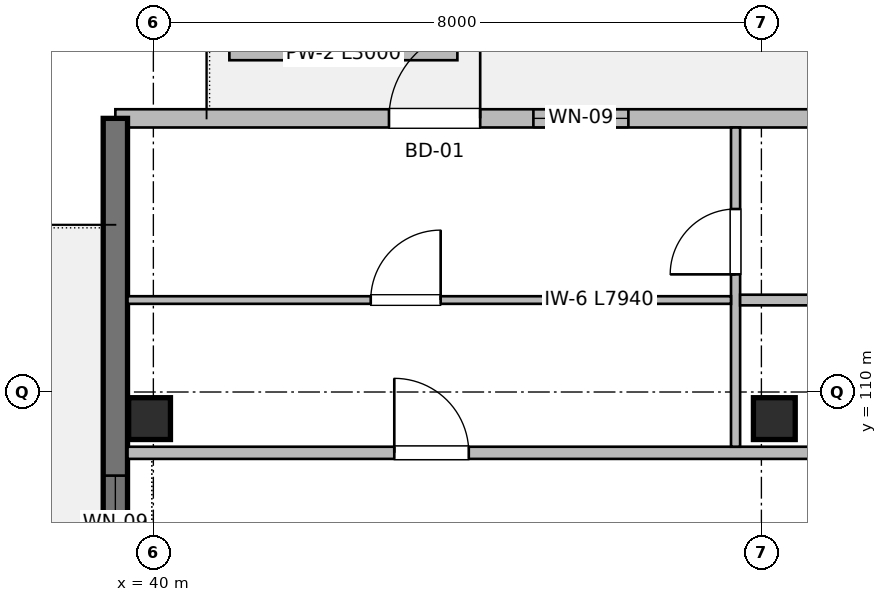
"""IFC4 building model, lengths in metres.
Left out: names, types, materials, properties, quantities, classifications, styles, units other than length and angle.
Written with IfcOpenShell. Run it as: python <this file> out.ifc"""

import sys

from ifc_helpers import new_model, si_unit, direction, frame, frame_2d, origin, origin_2d, place, context, subcontext, project, spatial, rectangle, extrude, element, fill, save


model = new_model("IFC4")
c1 = context("Model", 3, precision=1e-05, world=origin(), true_north=direction((0.0, 1.0)))
c2 = subcontext(c1, "Body", "Model", "MODEL_VIEW")
j1 = project(units=[si_unit("LENGTHUNIT", "METRE"), si_unit("PLANEANGLEUNIT", "RADIAN")], contexts=[c1])
p1 = place(None, origin())
s1 = spatial("IfcSite", under=j1, at=p1, CompositionType="ELEMENT")
p2 = place(p1, origin())
s2 = spatial("IfcBuilding", under=s1, at=p2, CompositionType="ELEMENT")
p3 = place(p2, frame((0.0, 0.0, 26.56)))
s3 = spatial("IfcBuildingStorey", under=s2, at=p3, CompositionType="ELEMENT", Elevation=26.56)
for number, where, z_axis, x_axis in (
    (1, (39.95, 109.65, 0.0), (0.0, 0.0, 1.0), (1.0, 0.0, 0.0)),
    (2, (48.17, 109.65, 0.0), (0.0, 0.0, 1.0), (1.0, 0.0, 0.0)),
):
    element("IfcColumn", number, at=place(p3, frame(where, z_axis=z_axis, x_axis=x_axis)), inside=s3, PredefinedType="COLUMN", context=c2, shape_type="SweptSolid", body=[
        extrude(rectangle(XDim=0.55, YDim=0.55, at=origin_2d()), origin(), (0.0, 0.0, 1.0), 3.2),
    ])
p4 = place(p3, frame((39.5, 113.6, 0.0), z_axis=(0.0, 0.0, 1.0), x_axis=(1.0, 0.0, 0.0)))
e3 = element("IfcWall", 3, at=p4, inside=s3, PredefinedType="SOLIDWALL", context=c2, shape_type="SweptSolid", body=[
    extrude(rectangle(XDim=42.0, YDim=0.24, at=frame_2d((21.0, 0.0))), origin(), (0.0, 0.0, 1.0), 2.98),
])
p5 = place(p4, frame((3.6, 0.0, 0.0)))
e4 = element("IfcOpeningElement", 4, at=p5, cuts=e3, PredefinedType="OPENING", context=c2, shape_type="SweptSolid", body=[
    extrude(rectangle(XDim=1.2, YDim=2.2, at=frame_2d((0.6, 1.1))), frame((0.0, 0.13, 0.0), z_axis=(0.0, -1.0, 0.0), x_axis=(1.0, 0.0, 0.0)), (0.0, 0.0, 1.0), 0.26),
])
p6 = place(p4, frame((5.5, 0.0, 0.87)))
e5 = element("IfcOpeningElement", 5, at=p6, cuts=e3, PredefinedType="OPENING", context=c2, shape_type="SweptSolid", body=[
    extrude(rectangle(XDim=1.25, YDim=1.35, at=frame_2d((0.625, 0.675))), frame((0.0, 0.13, 0.0), z_axis=(0.0, -1.0, 0.0), x_axis=(1.0, 0.0, 0.0)), (0.0, 0.0, 1.0), 0.26),
])
p7 = place(p4, frame((11.76, 0.0, 0.72)))
e6 = element("IfcOpeningElement", 6, at=p7, cuts=e3, PredefinedType="OPENING", context=c2, shape_type="SweptSolid", body=[
    extrude(rectangle(XDim=1.68, YDim=1.5, at=frame_2d((0.84, 0.75))), frame((0.0, 0.13, 0.0), z_axis=(0.0, -1.0, 0.0), x_axis=(1.0, 0.0, 0.0)), (0.0, 0.0, 1.0), 0.26),
])
p8 = place(p4, frame((20.4, 0.0, 0.0)))
e7 = element("IfcOpeningElement", 7, at=p8, cuts=e3, PredefinedType="OPENING", context=c2, shape_type="SweptSolid", body=[
    extrude(rectangle(XDim=1.2, YDim=2.2, at=frame_2d((0.6, 1.1))), frame((0.0, 0.13, 0.0), z_axis=(0.0, -1.0, 0.0), x_axis=(1.0, 0.0, 0.0)), (0.0, 0.0, 1.0), 0.26),
])
p9 = place(p4, frame((22.3, 0.0, 0.67)))
e8 = element("IfcOpeningElement", 8, at=p9, cuts=e3, PredefinedType="OPENING", context=c2, shape_type="SweptSolid", body=[
    extrude(rectangle(XDim=2.1, YDim=1.55, at=frame_2d((1.05, 0.775))), frame((0.0, 0.13, 0.0), z_axis=(0.0, -1.0, 0.0), x_axis=(1.0, 0.0, 0.0)), (0.0, 0.0, 1.0), 0.26),
])
p10 = place(p4, frame((28.4, 0.0, 0.72)))
e9 = element("IfcOpeningElement", 9, at=p10, cuts=e3, PredefinedType="OPENING", context=c2, shape_type="SweptSolid", body=[
    extrude(rectangle(XDim=2.0, YDim=1.5, at=frame_2d((1.0, 0.75))), frame((0.0, 0.13, 0.0), z_axis=(0.0, -1.0, 0.0), x_axis=(1.0, 0.0, 0.0)), (0.0, 0.0, 1.0), 0.26),
])
p11 = place(p4, frame((37.2, 0.0, 0.0)))
e10 = element("IfcOpeningElement", 10, at=p11, cuts=e3, PredefinedType="OPENING", context=c2, shape_type="SweptSolid", body=[
    extrude(rectangle(XDim=1.2, YDim=2.2, at=frame_2d((0.6, 1.1))), frame((0.0, 0.13, 0.0), z_axis=(0.0, -1.0, 0.0), x_axis=(1.0, 0.0, 0.0)), (0.0, 0.0, 1.0), 0.26),
])
p12 = place(p4, frame((39.1, 0.0, 0.9)))
e11 = element("IfcOpeningElement", 11, at=p12, cuts=e3, PredefinedType="OPENING", context=c2, shape_type="SweptSolid", body=[
    extrude(rectangle(XDim=1.05, YDim=1.15, at=frame_2d((0.525, 0.575))), frame((0.0, 0.13, 0.0), z_axis=(0.0, -1.0, 0.0), x_axis=(1.0, 0.0, 0.0)), (0.0, 0.0, 1.0), 0.26),
])
p13 = place(p3, frame((39.5, 100.0, 0.0), z_axis=(0.0, 0.0, 1.0), x_axis=(0.0, 1.0, 0.0)))
e12 = element("IfcWall", 12, at=p13, inside=s3, PredefinedType="SHEAR", context=c2, shape_type="SweptSolid", body=[
    extrude(rectangle(XDim=13.6, YDim=0.32, at=frame_2d((6.8, 0.0))), origin(), (0.0, 0.0, 1.0), 2.98),
])
p14 = place(p13, frame((4.9, 0.0, 0.0)))
e13 = element("IfcOpeningElement", 13, at=p14, cuts=e12, PredefinedType="OPENING", context=c2, shape_type="SweptSolid", body=[
    extrude(rectangle(XDim=1.2, YDim=2.2, at=frame_2d((0.6, 1.1))), frame((0.0, 0.17, 0.0), z_axis=(0.0, -1.0, 0.0), x_axis=(1.0, 0.0, 0.0)), (0.0, 0.0, 1.0), 0.34),
])
p15 = place(p13, frame((7.65, 0.0, 0.87)))
e14 = element("IfcOpeningElement", 14, at=p15, cuts=e12, PredefinedType="OPENING", context=c2, shape_type="SweptSolid", body=[
    extrude(rectangle(XDim=1.25, YDim=1.35, at=frame_2d((0.625, 0.675))), frame((0.0, 0.17, 0.0), z_axis=(0.0, -1.0, 0.0), x_axis=(1.0, 0.0, 0.0)), (0.0, 0.0, 1.0), 0.34),
])
p16 = place(p3, frame((41.0, 114.45, 0.0), z_axis=(0.0, 0.0, 1.0), x_axis=(1.0, 0.0, 0.0)))
e15 = element("IfcWall", 15, at=p16, inside=s3, PredefinedType="PARAPET", context=c2, shape_type="SweptSolid", body=[
    extrude(rectangle(XDim=3.0, YDim=0.17, at=frame_2d((1.5, 0.0))), origin(), (0.0, 0.0, 1.0), 0.45),
])
p17 = place(p3, frame((39.66, 109.2, 0.0), z_axis=(0.0, 0.0, 1.0), x_axis=(1.0, 0.0, 0.0)))
e16 = element("IfcWall", 16, at=p17, inside=s3, PredefinedType="PARTITIONING", context=c2, shape_type="SweptSolid", body=[
    extrude(rectangle(XDim=41.68, YDim=0.16, at=frame_2d((20.84, 0.0))), origin(), (0.0, 0.0, 1.0), 2.935),
])
p18 = place(p17, frame((3.51, 0.0, 0.0)))
e17 = element("IfcOpeningElement", 17, at=p18, cuts=e16, PredefinedType="OPENING", context=c2, shape_type="SweptSolid", body=[
    extrude(rectangle(XDim=0.98, YDim=2.15, at=frame_2d((0.49, 1.075))), frame((0.0, 0.09, 0.0), z_axis=(0.0, -1.0, 0.0), x_axis=(1.0, 0.0, 0.0)), (0.0, 0.0, 1.0), 0.18),
])
p19 = place(p17, frame((17.47, 0.0, 0.0)))
e18 = element("IfcOpeningElement", 18, at=p19, cuts=e16, PredefinedType="OPENING", context=c2, shape_type="SweptSolid", body=[
    extrude(rectangle(XDim=0.98, YDim=2.15, at=frame_2d((0.49, 1.075))), frame((0.0, 0.09, 0.0), z_axis=(0.0, -1.0, 0.0), x_axis=(1.0, 0.0, 0.0)), (0.0, 0.0, 1.0), 0.18),
])
p20 = place(p17, frame((31.39, 0.0, 0.0)))
e19 = element("IfcOpeningElement", 19, at=p20, cuts=e16, PredefinedType="OPENING", context=c2, shape_type="SweptSolid", body=[
    extrude(rectangle(XDim=0.98, YDim=2.15, at=frame_2d((0.49, 1.075))), frame((0.0, 0.09, 0.0), z_axis=(0.0, -1.0, 0.0), x_axis=(1.0, 0.0, 0.0)), (0.0, 0.0, 1.0), 0.18),
])
p21 = place(p3, frame((47.66, 109.28, 0.0), z_axis=(0.0, 0.0, 1.0), x_axis=(0.0, 1.0, 0.0)))
e20 = element("IfcWall", 20, at=p21, inside=s3, PredefinedType="PARTITIONING", context=c2, shape_type="SweptSolid", body=[
    extrude(rectangle(XDim=4.2, YDim=0.12, at=frame_2d((2.1, 0.0))), origin(), (0.0, 0.0, 1.0), 2.935),
])
p22 = place(p21, frame((2.268, 0.0, 0.0)))
e21 = element("IfcOpeningElement", 21, at=p22, cuts=e20, PredefinedType="OPENING", context=c2, shape_type="SweptSolid", body=[
    extrude(rectangle(XDim=0.86, YDim=2.1, at=frame_2d((0.43, 1.05))), frame((0.0, 0.07, 0.0), z_axis=(0.0, -1.0, 0.0), x_axis=(1.0, 0.0, 0.0)), (0.0, 0.0, 1.0), 0.14),
])
p23 = place(p3, frame((47.72, 111.21, 0.0), z_axis=(0.0, 0.0, 1.0), x_axis=(1.0, 0.0, 0.0)))
e22 = element("IfcWall", 22, at=p23, inside=s3, PredefinedType="PARTITIONING", context=c2, shape_type="SweptSolid", body=[
    extrude(rectangle(XDim=5.74, YDim=0.14, at=frame_2d((2.87, 0.0))), origin(), (0.0, 0.0, 1.0), 2.935),
])
p24 = place(p23, frame((2.32, 0.0, 0.0)))
e23 = element("IfcOpeningElement", 23, at=p24, cuts=e22, PredefinedType="OPENING", context=c2, shape_type="SweptSolid", body=[
    extrude(rectangle(XDim=0.85, YDim=2.05, at=frame_2d((0.425, 1.025))), frame((0.0, 0.08, 0.0), z_axis=(0.0, -1.0, 0.0), x_axis=(1.0, 0.0, 0.0)), (0.0, 0.0, 1.0), 0.16),
])
p25 = place(p3, frame((39.66, 111.21, 0.0), z_axis=(0.0, 0.0, 1.0), x_axis=(1.0, 0.0, 0.0)))
e24 = element("IfcWall", 24, at=p25, inside=s3, PredefinedType="PARTITIONING", context=c2, shape_type="SweptSolid", body=[
    extrude(rectangle(XDim=7.94, YDim=0.1, at=frame_2d((3.97, 0.0))), origin(), (0.0, 0.0, 1.0), 2.935),
])
p26 = place(p25, frame((3.2, 0.0, 0.0)))
e25 = element("IfcOpeningElement", 25, at=p26, cuts=e24, PredefinedType="OPENING", context=c2, shape_type="SweptSolid", body=[
    extrude(rectangle(XDim=0.92, YDim=2.1, at=frame_2d((0.46, 1.05))), frame((0.0, 0.06, 0.0), z_axis=(0.0, -1.0, 0.0), x_axis=(1.0, 0.0, 0.0)), (0.0, 0.0, 1.0), 0.12),
])
p27 = place(p5, origin())
e26 = element("IfcDoor", 26, at=p27, inside=s3, OperationType="SINGLE_SWING_RIGHT", PredefinedType="DOOR", context=c2, shape_type="SweptSolid", body=[
    extrude(rectangle(XDim=1.2, YDim=2.2, at=frame_2d((0.6, 1.1))), frame((0.0, 0.025, 0.0), z_axis=(0.0, -1.0, 0.0), x_axis=(1.0, 0.0, 0.0)), (0.0, 0.0, 1.0), 0.05),
])
fill(e4, e26)
p28 = place(p6, origin())
e27 = element("IfcWindow", 27, at=p28, inside=s3, PartitioningType="SINGLE_PANEL", PredefinedType="WINDOW", context=c2, shape_type="SweptSolid", body=[
    extrude(rectangle(XDim=1.25, YDim=1.35, at=frame_2d((0.625, 0.675))), frame((0.0, 0.03, 0.0), z_axis=(0.0, -1.0, 0.0), x_axis=(1.0, 0.0, 0.0)), (0.0, 0.0, 1.0), 0.06),
])
fill(e5, e27)
p29 = place(p15, origin())
e28 = element("IfcWindow", 28, at=p29, inside=s3, PartitioningType="SINGLE_PANEL", PredefinedType="WINDOW", context=c2, shape_type="SweptSolid", body=[
    extrude(rectangle(XDim=1.25, YDim=1.35, at=frame_2d((0.625, 0.675))), frame((0.0, 0.03, 0.0), z_axis=(0.0, -1.0, 0.0), x_axis=(1.0, 0.0, 0.0)), (0.0, 0.0, 1.0), 0.06),
])
fill(e14, e28)
p30 = place(p18, origin())
e29 = element("IfcDoor", 29, at=p30, inside=s3, OperationType="SINGLE_SWING_LEFT", PredefinedType="DOOR", context=c2, shape_type="SweptSolid", body=[
    extrude(rectangle(XDim=0.98, YDim=2.15, at=frame_2d((0.49, 1.075))), frame((0.0, 0.025, 0.0), z_axis=(0.0, -1.0, 0.0), x_axis=(1.0, 0.0, 0.0)), (0.0, 0.0, 1.0), 0.05),
])
fill(e17, e29)
p31 = place(p26, origin())
e30 = element("IfcDoor", 30, at=p31, inside=s3, OperationType="SINGLE_SWING_RIGHT", PredefinedType="DOOR", context=c2, shape_type="SweptSolid", body=[
    extrude(rectangle(XDim=0.92, YDim=2.1, at=frame_2d((0.46, 1.05))), frame((0.0, 0.025, 0.0), z_axis=(0.0, -1.0, 0.0), x_axis=(1.0, 0.0, 0.0)), (0.0, 0.0, 1.0), 0.05),
])
fill(e25, e30)
p32 = place(p22, origin())
e31 = element("IfcDoor", 31, at=p32, inside=s3, OperationType="SINGLE_SWING_LEFT", PredefinedType="DOOR", context=c2, shape_type="SweptSolid", body=[
    extrude(rectangle(XDim=0.86, YDim=2.1, at=frame_2d((0.43, 1.05))), frame((0.0, 0.025, 0.0), z_axis=(0.0, -1.0, 0.0), x_axis=(1.0, 0.0, 0.0)), (0.0, 0.0, 1.0), 0.05),
])
fill(e21, e31)
save(model, sys.argv[1])
